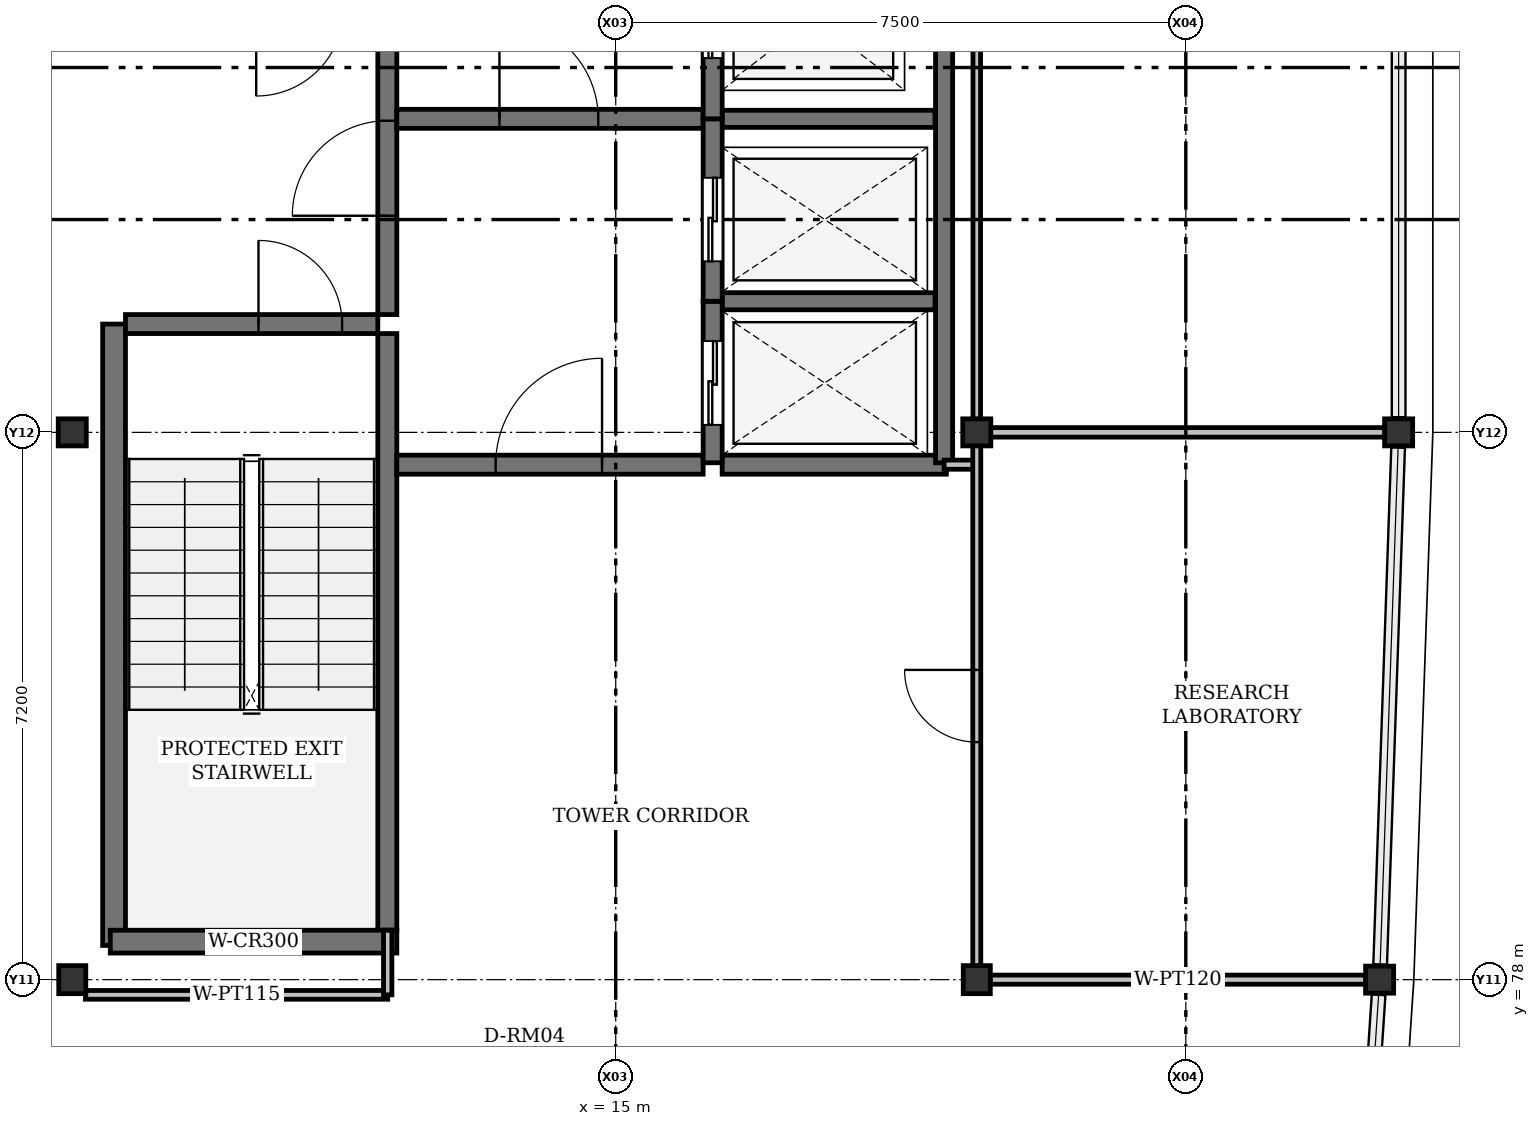
"""IFC4 building model, lengths in metres.
Left out: names, types, materials, properties, quantities, classifications, styles, units other than length and angle.
Written with IfcOpenShell. Run it as: python <this file> out.ifc"""

import sys

from ifc_helpers import new_model, si_unit, direction, frame, frame_2d, origin, origin_2d, place, context, subcontext, project, spatial, rectangle, i_section, extrude, element, fill, save


model = new_model("IFC4")
c1 = context("Model", 3, precision=1e-05, world=origin(), true_north=direction((0.0, 1.0)))
c2 = subcontext(c1, "Body", "Model", "MODEL_VIEW")
j1 = project(units=[si_unit("LENGTHUNIT", "METRE"), si_unit("PLANEANGLEUNIT", "RADIAN")], contexts=[c1])
p1 = place(None, origin())
s1 = spatial("IfcSite", under=j1, at=p1, CompositionType="ELEMENT")
p2 = place(p1, origin())
s2 = spatial("IfcBuilding", under=s1, at=p2, CompositionType="ELEMENT")
p3 = place(p2, frame((0.0, 0.0, 56.1)))
s3 = spatial("IfcBuildingStorey", under=s2, at=p3, CompositionType="ELEMENT", Elevation=56.1)
for number, where, z_axis, x_axis in (
    (1, (7.85, 78.0, 0.0), (0.0, 0.0, 1.0), (0.0, 1.0, 0.0)),
    (2, (19.75, 78.0, 0.0), (0.0, 0.0, 1.0), (0.0, 1.0, 0.0)),
    (3, (25.05, 78.0, 0.0), (0.0, 0.0, 1.0), (1.0, 0.0, 0.0)),
    (4, (7.85, 85.2, 0.0), (0.0, 0.0, 1.0), (1.0, 0.0, 0.0)),
    (5, (19.75, 85.2, 0.0), (0.0, 0.0, 1.0), (1.0, 0.0, 0.0)),
    (6, (25.3, 85.2, 0.0), (0.0, 0.0, 1.0), (1.0, 0.0, 0.0)),
):
    element("IfcColumn", number, at=place(p3, frame(where, z_axis=z_axis, x_axis=x_axis)), inside=s3, PredefinedType="COLUMN", context=c2, shape_type="SweptSolid", body=[
        extrude(i_section(OverallWidth=0.369, OverallDepth=0.356, WebThickness=0.011, FlangeThickness=0.018, FilletRadius=0.015, at=origin_2d()), origin(), (0.0, 0.0, 1.0), 4.2),
    ])
p4 = place(p3, frame((8.4, 78.45, 0.0), z_axis=(0.0, 0.0, 1.0), x_axis=(0.0, 1.0, 0.0)))
e7 = element("IfcWall", 7, at=p4, inside=s3, PredefinedType="SHEAR", context=c2, shape_type="SweptSolid", body=[
    extrude(rectangle(XDim=8.175, YDim=0.3, at=frame_2d((4.087, 0.0))), origin(), (0.0, 0.0, 1.0), 4.2),
])
p5 = place(p3, frame((11.995, 78.65, 0.0), z_axis=(0.0, 0.0, 1.0), x_axis=(0.0, 1.0, 0.0)))
e8 = element("IfcWall", 8, at=p5, inside=s3, PredefinedType="SHEAR", context=c2, shape_type="SweptSolid", body=[
    extrude(rectangle(XDim=7.85, YDim=0.25, at=frame_2d((3.925, 0.0))), origin(), (0.0, 0.0, 1.0), 4.2),
])
p6 = place(p3, frame((11.995, 86.75, 0.0), z_axis=(0.0, 0.0, 1.0), x_axis=(0.0, 1.0, 0.0)))
e9 = element("IfcWall", 9, at=p6, inside=s3, PredefinedType="SHEAR", context=c2, shape_type="SweptSolid", body=[
    extrude(rectangle(XDim=3.9, YDim=0.25, at=frame_2d((1.95, 0.0))), origin(), (0.0, 0.0, 1.0), 4.2),
])
p7 = place(p6, frame((1.3, 0.0, 0.0)))
e10 = element("IfcOpeningElement", 10, at=p7, cuts=e9, PredefinedType="OPENING", context=c2, shape_type="SweptSolid", body=[
    extrude(rectangle(XDim=1.25, YDim=2.2, at=frame_2d((0.625, 1.1))), frame((0.0, 0.125, 0.0), z_axis=(0.0, -1.0, 0.0), x_axis=(1.0, 0.0, 0.0)), (0.0, 0.0, 1.0), 0.25),
])
p8 = place(p3, frame((8.35, 78.5, 0.0), z_axis=(0.0, 0.0, 1.0), x_axis=(1.0, 0.0, 0.0)))
e11 = element("IfcWall", 11, at=p8, inside=s3, PredefinedType="SHEAR", context=c2, shape_type="SweptSolid", body=[
    extrude(rectangle(XDim=3.77, YDim=0.3, at=frame_2d((1.885, 0.0))), origin(), (0.0, 0.0, 1.0), 4.2),
])
p9 = place(p3, frame((8.55, 86.625, 0.0), z_axis=(0.0, 0.0, 1.0), x_axis=(1.0, 0.0, 0.0)))
e12 = element("IfcWall", 12, at=p9, inside=s3, PredefinedType="SHEAR", context=c2, shape_type="SweptSolid", body=[
    extrude(rectangle(XDim=3.32, YDim=0.25, at=frame_2d((1.66, 0.0))), origin(), (0.0, 0.0, 1.0), 4.2),
])
p10 = place(p9, frame((1.75, 0.0, 0.0)))
e13 = element("IfcOpeningElement", 13, at=p10, cuts=e12, PredefinedType="OPENING", context=c2, shape_type="SweptSolid", body=[
    extrude(rectangle(XDim=1.1, YDim=2.15, at=frame_2d((0.55, 1.075))), frame((0.0, 0.125, 0.0), z_axis=(0.0, -1.0, 0.0), x_axis=(1.0, 0.0, 0.0)), (0.0, 0.0, 1.0), 0.25),
])
p11 = place(p3, frame((12.12, 89.325, 0.0), z_axis=(0.0, 0.0, 1.0), x_axis=(1.0, 0.0, 0.0)))
e14 = element("IfcWall", 14, at=p11, inside=s3, PredefinedType="SHEAR", context=c2, shape_type="SweptSolid", body=[
    extrude(rectangle(XDim=4.03, YDim=0.25, at=frame_2d((2.015, 0.0))), origin(), (0.0, 0.0, 1.0), 4.2),
])
p12 = place(p11, frame((1.35, 0.0, 0.0)))
e15 = element("IfcOpeningElement", 15, at=p12, cuts=e14, PredefinedType="OPENING", context=c2, shape_type="SweptSolid", body=[
    extrude(rectangle(XDim=1.3, YDim=2.2, at=frame_2d((0.65, 1.1))), frame((0.0, 0.125, 0.0), z_axis=(0.0, -1.0, 0.0), x_axis=(1.0, 0.0, 0.0)), (0.0, 0.0, 1.0), 0.25),
])
p13 = place(p3, frame((12.12, 84.775, 0.0), z_axis=(0.0, 0.0, 1.0), x_axis=(1.0, 0.0, 0.0)))
e16 = element("IfcWall", 16, at=p13, inside=s3, PredefinedType="SHEAR", context=c2, shape_type="SweptSolid", body=[
    extrude(rectangle(XDim=4.03, YDim=0.25, at=frame_2d((2.015, 0.0))), origin(), (0.0, 0.0, 1.0), 4.2),
])
p14 = place(p13, frame((1.3, 0.0, 0.0)))
e17 = element("IfcOpeningElement", 17, at=p14, cuts=e16, PredefinedType="OPENING", context=c2, shape_type="SweptSolid", body=[
    extrude(rectangle(XDim=1.4, YDim=2.25, at=frame_2d((0.7, 1.125))), frame((0.0, 0.125, 0.0), z_axis=(0.0, -1.0, 0.0), x_axis=(1.0, 0.0, 0.0)), (0.0, 0.0, 1.0), 0.25),
])
p15 = place(p3, frame((16.4, 84.775, 0.0), z_axis=(0.0, 0.0, 1.0), x_axis=(1.0, 0.0, 0.0)))
e18 = element("IfcWall", 18, at=p15, inside=s3, PredefinedType="SHEAR", context=c2, shape_type="SweptSolid", body=[
    extrude(rectangle(XDim=2.95, YDim=0.25, at=frame_2d((1.475, 0.0))), origin(), (0.0, 0.0, 1.0), 4.2),
])
p16 = place(p3, frame((19.32, 84.8, 0.0), z_axis=(0.0, 0.0, 1.0), x_axis=(0.0, 1.0, 0.0)))
e19 = element("IfcWall", 19, at=p16, inside=s3, PredefinedType="SHEAR", context=c2, shape_type="SweptSolid", body=[
    extrude(rectangle(XDim=13.95, YDim=0.225, at=frame_2d((6.975, 0.0))), origin(), (0.0, 0.0, 1.0), 4.2),
])
for number, where, z_axis, x_axis in (
    (20, (16.4, 86.925, 0.0), (0.0, 0.0, 1.0), (1.0, 0.0, 0.0)),
    (21, (16.4, 89.325, 0.0), (0.0, 0.0, 1.0), (1.0, 0.0, 0.0)),
):
    element("IfcWall", number, at=place(p3, frame(where, z_axis=z_axis, x_axis=x_axis)), inside=s3, PredefinedType="SHEAR", context=c2, shape_type="SweptSolid", body=[
        extrude(rectangle(XDim=2.8, YDim=0.225, at=frame_2d((1.4, 0.0))), origin(), (0.0, 0.0, 1.0), 4.2),
    ])
p17 = place(p3, frame((16.275, 84.8, 0.0), z_axis=(0.0, 0.0, 1.0), x_axis=(0.0, 1.0, 0.0)))
e22 = element("IfcWall", 22, at=p17, inside=s3, PredefinedType="SHEAR", context=c2, shape_type="SweptSolid", body=[
    extrude(rectangle(XDim=2.125, YDim=0.25, at=frame_2d((1.062, 0.0))), origin(), (0.0, 0.0, 1.0), 4.2),
])
p18 = place(p17, frame((0.5, 0.0, 0.0)))
e23 = element("IfcOpeningElement", 23, at=p18, cuts=e22, PredefinedType="OPENING", context=c2, shape_type="SweptSolid", body=[
    extrude(rectangle(XDim=1.1, YDim=2.15, at=frame_2d((0.55, 1.075))), frame((0.0, 0.125, 0.0), z_axis=(0.0, -1.0, 0.0), x_axis=(1.0, 0.0, 0.0)), (0.0, 0.0, 1.0), 0.25),
])
p19 = place(p3, frame((16.275, 86.925, 0.0), z_axis=(0.0, 0.0, 1.0), x_axis=(0.0, 1.0, 0.0)))
e24 = element("IfcWall", 24, at=p19, inside=s3, PredefinedType="SHEAR", context=c2, shape_type="SweptSolid", body=[
    extrude(rectangle(XDim=2.4, YDim=0.25, at=frame_2d((1.2, 0.0))), origin(), (0.0, 0.0, 1.0), 4.2),
])
p20 = place(p19, frame((0.525, 0.0, 0.0)))
e25 = element("IfcOpeningElement", 25, at=p20, cuts=e24, PredefinedType="OPENING", context=c2, shape_type="SweptSolid", body=[
    extrude(rectangle(XDim=1.1, YDim=2.15, at=frame_2d((0.55, 1.075))), frame((0.0, 0.125, 0.0), z_axis=(0.0, -1.0, 0.0), x_axis=(1.0, 0.0, 0.0)), (0.0, 0.0, 1.0), 0.25),
])
p21 = place(p3, frame((16.275, 89.325, 0.0), z_axis=(0.0, 0.0, 1.0), x_axis=(0.0, 1.0, 0.0)))
e26 = element("IfcWall", 26, at=p21, inside=s3, PredefinedType="SHEAR", context=c2, shape_type="SweptSolid", body=[
    extrude(rectangle(XDim=2.4, YDim=0.25, at=frame_2d((1.2, 0.0))), origin(), (0.0, 0.0, 1.0), 4.2),
])
p22 = place(p21, frame((0.8, 0.0, 0.0)))
e27 = element("IfcOpeningElement", 27, at=p22, cuts=e26, PredefinedType="OPENING", context=c2, shape_type="SweptSolid", body=[
    extrude(rectangle(XDim=1.05, YDim=2.15, at=frame_2d((0.525, 1.075))), frame((0.0, 0.125, 0.0), z_axis=(0.0, -1.0, 0.0), x_axis=(1.0, 0.0, 0.0)), (0.0, 0.0, 1.0), 0.25),
])
p23 = place(p3, frame((19.32, 84.775, 0.0), z_axis=(0.0, 0.0, 1.0), x_axis=(1.0, 0.0, 0.0)))
e28 = element("IfcWall", 28, at=p23, inside=s3, PredefinedType="PARTITIONING", context=c2, shape_type="SweptSolid", body=[
    extrude(rectangle(XDim=0.43, YDim=0.12, at=frame_2d((0.215, 0.0))), origin(), (0.0, 0.0, 1.0), 3.512),
])
p24 = place(p3, frame((8.023, 77.8, 0.0), z_axis=(0.0, 0.0, 1.0), x_axis=(1.0, 0.0, 0.0)))
e29 = element("IfcWall", 29, at=p24, inside=s3, PredefinedType="PARTITIONING", context=c2, shape_type="SweptSolid", body=[
    extrude(rectangle(XDim=3.977, YDim=0.115, at=frame_2d((1.989, 0.0))), origin(), (0.0, 0.0, 1.0), 3.436),
])
p25 = place(p3, frame((12.0, 77.8, 0.0), z_axis=(0.0, 0.0, 1.0), x_axis=(0.0, 1.0, 0.0)))
e30 = element("IfcWall", 30, at=p25, inside=s3, PredefinedType="PARTITIONING", context=c2, shape_type="SweptSolid", body=[
    extrude(rectangle(XDim=0.85, YDim=0.11, at=frame_2d((0.425, 0.0))), origin(), (0.0, 0.0, 1.0), 3.436),
])
p26 = place(p3, frame((19.75, 78.179, 0.0), z_axis=(0.0, 0.0, 1.0), x_axis=(0.0, 1.0, 0.0)))
e31 = element("IfcWall", 31, at=p26, inside=s3, PredefinedType="PARTITIONING", context=c2, shape_type="SweptSolid", body=[
    extrude(rectangle(XDim=6.848, YDim=0.105, at=frame_2d((3.424, 0.0))), origin(), (0.0, 0.0, 1.0), 3.512),
])
p27 = place(p26, frame((2.946, 0.0, 0.0)))
e32 = element("IfcOpeningElement", 32, at=p27, cuts=e31, PredefinedType="OPENING", context=c2, shape_type="SweptSolid", body=[
    extrude(rectangle(XDim=0.95, YDim=2.1, at=frame_2d((0.475, 1.05))), frame((0.0, 0.052, 0.0), z_axis=(0.0, -1.0, 0.0), x_axis=(1.0, 0.0, 0.0)), (0.0, 0.0, 1.0), 0.105),
])
p28 = place(p3, frame((19.75, 85.373, 0.0), z_axis=(0.0, 0.0, 1.0), x_axis=(0.0, 1.0, 0.0)))
e33 = element("IfcWall", 33, at=p28, inside=s3, PredefinedType="PARTITIONING", context=c2, shape_type="SweptSolid", body=[
    extrude(rectangle(XDim=6.847, YDim=0.1, at=frame_2d((3.424, 0.0))), origin(), (0.0, 0.0, 1.0), 3.512),
])
p29 = place(p3, frame((25.121, 85.2, 0.0), z_axis=(0.0, 0.0, 1.0), x_axis=(-1.0, 0.0, 0.0)))
e34 = element("IfcWall", 34, at=p29, inside=s3, PredefinedType="PARTITIONING", context=c2, shape_type="SweptSolid", body=[
    extrude(rectangle(XDim=5.191, YDim=0.125, at=frame_2d((2.596, 0.0))), origin(), (0.0, 0.0, 1.0), 2.775),
])
p30 = place(p3, frame((24.871, 78.0, 0.0), z_axis=(0.0, 0.0, 1.0), x_axis=(-1.0, 0.0, 0.0)))
e35 = element("IfcWall", 35, at=p30, inside=s3, PredefinedType="PARTITIONING", context=c2, shape_type="SweptSolid", body=[
    extrude(rectangle(XDim=4.948, YDim=0.12, at=frame_2d((2.474, 0.0))), origin(), (0.0, 0.0, 1.0), 2.775),
])
p31 = place(p7, origin())
e36 = element("IfcDoor", 36, at=p31, inside=s3, OperationType="SINGLE_SWING_LEFT", PredefinedType="DOOR", context=c2, shape_type="SweptSolid", body=[
    extrude(rectangle(XDim=1.25, YDim=2.2, at=frame_2d((0.625, 1.1))), frame((0.0, 0.025, 0.0), z_axis=(0.0, -1.0, 0.0), x_axis=(1.0, 0.0, 0.0)), (0.0, 0.0, 1.0), 0.05),
])
fill(e10, e36)
p32 = place(p10, origin())
e37 = element("IfcDoor", 37, at=p32, inside=s3, OperationType="SINGLE_SWING_LEFT", PredefinedType="DOOR", context=c2, shape_type="SweptSolid", body=[
    extrude(rectangle(XDim=1.1, YDim=2.15, at=frame_2d((0.55, 1.075))), frame((0.0, 0.025, 0.0), z_axis=(0.0, -1.0, 0.0), x_axis=(1.0, 0.0, 0.0)), (0.0, 0.0, 1.0), 0.05),
])
fill(e13, e37)
p33 = place(p12, origin())
e38 = element("IfcDoor", 38, at=p33, inside=s3, OperationType="SINGLE_SWING_LEFT", PredefinedType="DOOR", context=c2, shape_type="SweptSolid", body=[
    extrude(rectangle(XDim=1.3, YDim=2.2, at=frame_2d((0.65, 1.1))), frame((0.0, 0.025, 0.0), z_axis=(0.0, -1.0, 0.0), x_axis=(1.0, 0.0, 0.0)), (0.0, 0.0, 1.0), 0.05),
])
fill(e15, e38)
p34 = place(p14, origin())
e39 = element("IfcDoor", 39, at=p34, inside=s3, OperationType="SINGLE_SWING_RIGHT", PredefinedType="DOOR", context=c2, shape_type="SweptSolid", body=[
    extrude(rectangle(XDim=1.4, YDim=2.25, at=frame_2d((0.7, 1.125))), frame((0.0, 0.025, 0.0), z_axis=(0.0, -1.0, 0.0), x_axis=(1.0, 0.0, 0.0)), (0.0, 0.0, 1.0), 0.05),
])
fill(e17, e39)
p35 = place(p18, origin())
e40 = element("IfcDoor", 40, at=p35, inside=s3, OperationType="SLIDING_TO_LEFT", PredefinedType="DOOR", context=c2, shape_type="SweptSolid", body=[
    extrude(rectangle(XDim=1.1, YDim=2.15, at=frame_2d((0.55, 1.075))), frame((0.0, 0.025, 0.0), z_axis=(0.0, -1.0, 0.0), x_axis=(1.0, 0.0, 0.0)), (0.0, 0.0, 1.0), 0.05),
])
fill(e23, e40)
p36 = place(p20, origin())
e41 = element("IfcDoor", 41, at=p36, inside=s3, OperationType="SLIDING_TO_LEFT", PredefinedType="DOOR", context=c2, shape_type="SweptSolid", body=[
    extrude(rectangle(XDim=1.1, YDim=2.15, at=frame_2d((0.55, 1.075))), frame((0.0, 0.025, 0.0), z_axis=(0.0, -1.0, 0.0), x_axis=(1.0, 0.0, 0.0)), (0.0, 0.0, 1.0), 0.05),
])
fill(e25, e41)
p37 = place(p22, origin())
e42 = element("IfcDoor", 42, at=p37, inside=s3, OperationType="SLIDING_TO_LEFT", PredefinedType="DOOR", context=c2, shape_type="SweptSolid", body=[
    extrude(rectangle(XDim=1.05, YDim=2.15, at=frame_2d((0.525, 1.075))), frame((0.0, 0.025, 0.0), z_axis=(0.0, -1.0, 0.0), x_axis=(1.0, 0.0, 0.0)), (0.0, 0.0, 1.0), 0.05),
])
fill(e27, e42)
p38 = place(p27, origin())
e43 = element("IfcDoor", 43, at=p38, inside=s3, OperationType="SINGLE_SWING_RIGHT", PredefinedType="DOOR", context=c2, shape_type="SweptSolid", body=[
    extrude(rectangle(XDim=0.95, YDim=2.1, at=frame_2d((0.475, 1.05))), frame((0.0, 0.025, 0.0), z_axis=(0.0, -1.0, 0.0), x_axis=(1.0, 0.0, 0.0)), (0.0, 0.0, 1.0), 0.05),
])
fill(e32, e43)
save(model, sys.argv[1])
